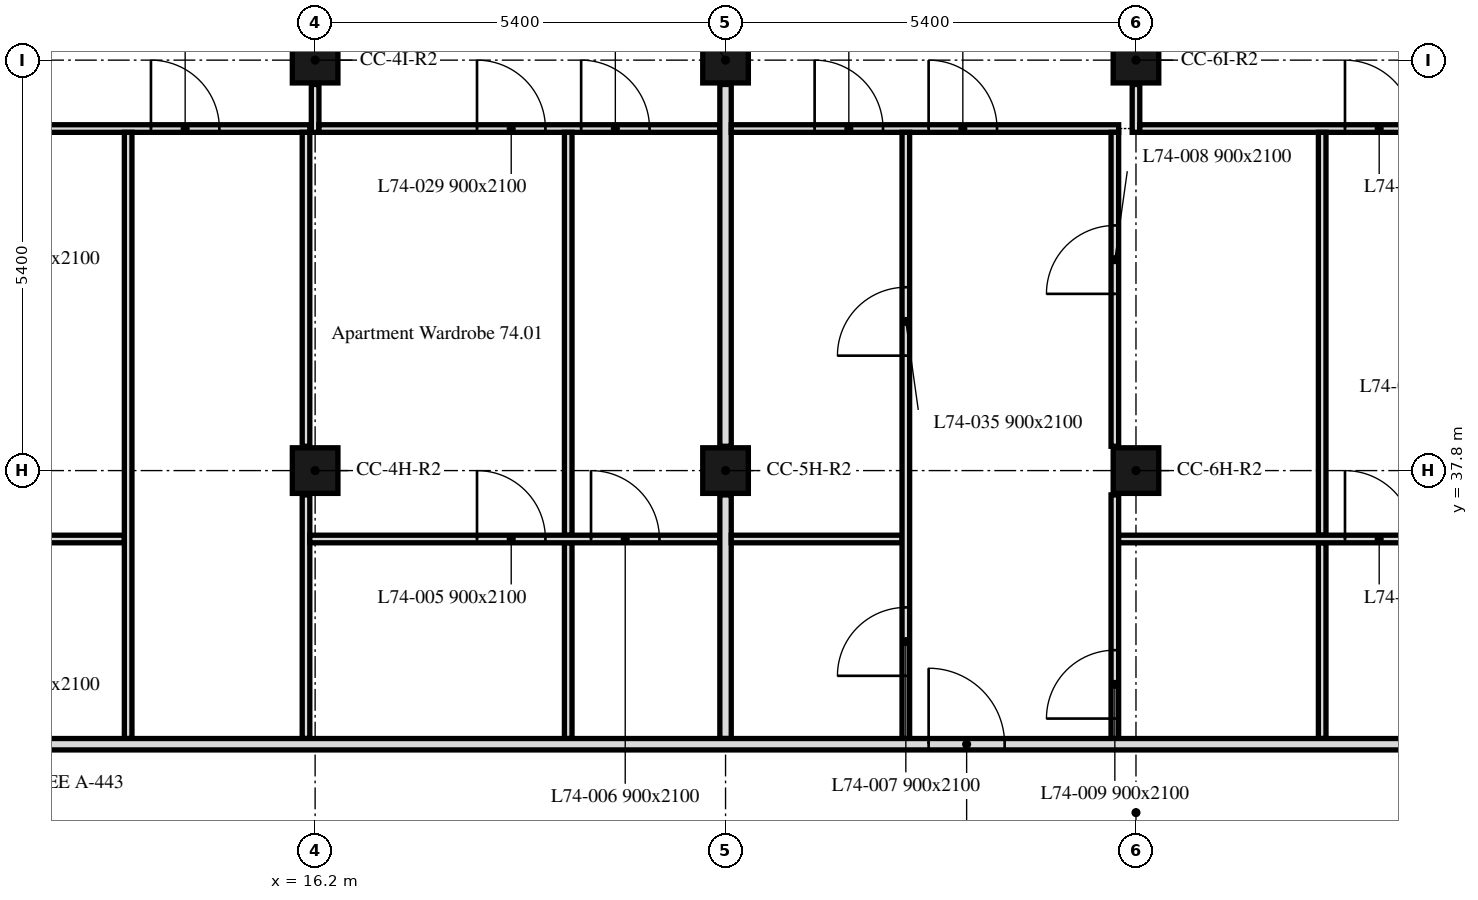
"""IFC4 building model, lengths in metres.
Left out: names, types, materials, properties, quantities, classifications, styles, units other than length and angle.
Written with IfcOpenShell. Run it as: python <this file> out.ifc"""

import sys

from ifc_helpers import new_model, si_unit, direction, frame, frame_2d, origin, origin_2d, place, context, subcontext, project, spatial, rectangle, extrude, element, fill, save


model = new_model("IFC4")
c1 = context("Model", 3, precision=1e-05, world=origin(), true_north=direction((0.0, 1.0)))
c2 = subcontext(c1, "Body", "Model", "MODEL_VIEW")
j1 = project(units=[si_unit("LENGTHUNIT", "METRE"), si_unit("PLANEANGLEUNIT", "RADIAN")], contexts=[c1])
p1 = place(None, origin())
s1 = spatial("IfcSite", under=j1, at=p1, CompositionType="ELEMENT")
p2 = place(p1, origin())
s2 = spatial("IfcBuilding", under=s1, at=p2, CompositionType="ELEMENT")
p3 = place(p2, frame((0.0, 0.0, 298.3)))
s3 = spatial("IfcBuildingStorey", under=s2, at=p3, CompositionType="ELEMENT", Elevation=298.3)
for number, where, z_axis, x_axis in (
    (1, (16.2, 37.8, 0.0), (0.0, 0.0, 1.0), (1.0, 0.0, 0.0)),
    (2, (21.6, 37.8, 0.0), (0.0, 0.0, 1.0), (1.0, 0.0, 0.0)),
    (3, (27.0, 37.8, 0.0), (0.0, 0.0, 1.0), (1.0, 0.0, 0.0)),
    (4, (16.2, 43.2, 0.0), (0.0, 0.0, 1.0), (1.0, 0.0, 0.0)),
    (5, (21.6, 43.2, 0.0), (0.0, 0.0, 1.0), (1.0, 0.0, 0.0)),
    (6, (27.0, 43.2, 0.0), (0.0, 0.0, 1.0), (1.0, 0.0, 0.0)),
):
    element("IfcColumn", number, at=place(p3, frame(where, z_axis=z_axis, x_axis=x_axis)), inside=s3, PredefinedType="COLUMN", context=c2, shape_type="SweptSolid", body=[
        extrude(rectangle(XDim=0.6, YDim=0.6, at=origin_2d()), origin(), (0.0, 0.0, 1.0), 3.0),
    ])
p4 = place(p3, frame((6.151, 42.3, 0.0), z_axis=(0.0, 0.0, 1.0), x_axis=(1.0, 0.0, 0.0)))
e7 = element("IfcWall", 7, at=p4, inside=s3, PredefinedType="PARTITIONING", context=c2, shape_type="SweptSolid", body=[
    extrude(rectangle(XDim=9.979, YDim=0.1, at=frame_2d((4.99, 0.0))), origin(), (0.0, 0.0, 1.0), 3.0),
])
p5 = place(p4, frame((7.889, 0.0, 0.0)))
e8 = element("IfcOpeningElement", 8, at=p5, cuts=e7, PredefinedType="OPENING", context=c2, shape_type="SweptSolid", body=[
    extrude(rectangle(XDim=0.9, YDim=2.1, at=frame_2d((0.45, 1.05))), frame((0.0, 0.05, 0.0), z_axis=(0.0, -1.0, 0.0), x_axis=(1.0, 0.0, 0.0)), (0.0, 0.0, 1.0), 0.1),
])
p6 = place(p4, frame((1.019, 0.0, 0.0)))
e9 = element("IfcOpeningElement", 9, at=p6, cuts=e7, PredefinedType="OPENING", context=c2, shape_type="SweptSolid", body=[
    extrude(rectangle(XDim=0.9, YDim=2.1, at=frame_2d((0.45, 1.05))), frame((0.0, 0.05, 0.0), z_axis=(0.0, -1.0, 0.0), x_axis=(1.0, 0.0, 0.0)), (0.0, 0.0, 1.0), 0.1),
])
p7 = place(p4, frame((2.389, 0.0, 0.0)))
e10 = element("IfcOpeningElement", 10, at=p7, cuts=e7, PredefinedType="OPENING", context=c2, shape_type="SweptSolid", body=[
    extrude(rectangle(XDim=0.9, YDim=2.1, at=frame_2d((0.45, 1.05))), frame((0.0, 0.05, 0.0), z_axis=(0.0, -1.0, 0.0), x_axis=(1.0, 0.0, 0.0)), (0.0, 0.0, 1.0), 0.1),
])
p8 = place(p3, frame((16.2, 42.25, 0.0), z_axis=(0.0, 0.0, 1.0), x_axis=(0.0, 1.0, 0.0)))
e11 = element("IfcWall", 11, at=p8, inside=s3, PredefinedType="PARTITIONING", context=c2, shape_type="SweptSolid", body=[
    extrude(rectangle(XDim=0.63, YDim=0.1, at=frame_2d((0.315, 0.0))), origin(), (0.0, 0.0, 1.0), 2.4),
])
p9 = place(p3, frame((16.25, 42.3, 0.0), z_axis=(0.0, 0.0, 1.0), x_axis=(1.0, 0.0, 0.0)))
e12 = element("IfcWall", 12, at=p9, inside=s3, PredefinedType="PARTITIONING", context=c2, shape_type="SweptSolid", body=[
    extrude(rectangle(XDim=5.275, YDim=0.1, at=frame_2d((2.637, 0.0))), origin(), (0.0, 0.0, 1.0), 3.0),
])
p10 = place(p9, frame((2.08, 0.0, 0.0)))
e13 = element("IfcOpeningElement", 13, at=p10, cuts=e12, PredefinedType="OPENING", context=c2, shape_type="SweptSolid", body=[
    extrude(rectangle(XDim=0.9, YDim=2.1, at=frame_2d((0.45, 1.05))), frame((0.0, 0.05, 0.0), z_axis=(0.0, -1.0, 0.0), x_axis=(1.0, 0.0, 0.0)), (0.0, 0.0, 1.0), 0.1),
])
p11 = place(p9, frame((3.45, 0.0, 0.0)))
e14 = element("IfcOpeningElement", 14, at=p11, cuts=e12, PredefinedType="OPENING", context=c2, shape_type="SweptSolid", body=[
    extrude(rectangle(XDim=0.9, YDim=2.1, at=frame_2d((0.45, 1.05))), frame((0.0, 0.05, 0.0), z_axis=(0.0, -1.0, 0.0), x_axis=(1.0, 0.0, 0.0)), (0.0, 0.0, 1.0), 0.1),
])
p12 = place(p3, frame((10.99, 36.9, 0.0), z_axis=(0.0, 0.0, 1.0), x_axis=(1.0, 0.0, 0.0)))
e15 = element("IfcWall", 15, at=p12, inside=s3, PredefinedType="PARTITIONING", context=c2, shape_type="SweptSolid", body=[
    extrude(rectangle(XDim=2.7, YDim=0.1, at=frame_2d((1.35, 0.0))), origin(), (0.0, 0.0, 1.0), 3.0),
])
p13 = place(p3, frame((13.74, 34.275, 0.0), z_axis=(0.0, 0.0, 1.0), x_axis=(0.0, 1.0, 0.0)))
e16 = element("IfcWall", 16, at=p13, inside=s3, PredefinedType="PARTITIONING", context=c2, shape_type="SweptSolid", body=[
    extrude(rectangle(XDim=7.975, YDim=0.1, at=frame_2d((3.988, 0.0))), origin(), (0.0, 0.0, 1.0), 3.0),
])
p14 = place(p3, frame((16.08, 34.275, 0.0), z_axis=(0.0, 0.0, 1.0), x_axis=(0.0, 1.0, 0.0)))
e17 = element("IfcWall", 17, at=p14, inside=s3, PredefinedType="PARTITIONING", context=c2, shape_type="SweptSolid", body=[
    extrude(rectangle(XDim=3.205, YDim=0.1, at=frame_2d((1.603, 0.0))), origin(), (0.0, 0.0, 1.0), 2.4),
])
p15 = place(p3, frame((16.08, 38.12, 0.0), z_axis=(0.0, 0.0, 1.0), x_axis=(0.0, 1.0, 0.0)))
e18 = element("IfcWall", 18, at=p15, inside=s3, PredefinedType="PARTITIONING", context=c2, shape_type="SweptSolid", body=[
    extrude(rectangle(XDim=4.13, YDim=0.1, at=frame_2d((2.065, 0.0))), origin(), (0.0, 0.0, 1.0), 2.4),
])
p16 = place(p3, frame((19.53, 36.95, 0.0), z_axis=(0.0, 0.0, 1.0), x_axis=(0.0, 1.0, 0.0)))
e19 = element("IfcWall", 19, at=p16, inside=s3, PredefinedType="PARTITIONING", context=c2, shape_type="SweptSolid", body=[
    extrude(rectangle(XDim=5.3, YDim=0.1, at=frame_2d((2.65, 0.0))), origin(), (0.0, 0.0, 1.0), 3.0),
])
p17 = place(p3, frame((19.53, 34.275, 0.0), z_axis=(0.0, 0.0, 1.0), x_axis=(0.0, 1.0, 0.0)))
e20 = element("IfcWall", 20, at=p17, inside=s3, PredefinedType="PARTITIONING", context=c2, shape_type="SweptSolid", body=[
    extrude(rectangle(XDim=2.575, YDim=0.1, at=frame_2d((1.288, 0.0))), origin(), (0.0, 0.0, 1.0), 3.0),
])
p18 = place(p3, frame((16.13, 36.9, 0.0), z_axis=(0.0, 0.0, 1.0), x_axis=(1.0, 0.0, 0.0)))
e21 = element("IfcWall", 21, at=p18, inside=s3, PredefinedType="PARTITIONING", context=c2, shape_type="SweptSolid", body=[
    extrude(rectangle(XDim=5.395, YDim=0.1, at=frame_2d((2.698, 0.0))), origin(), (0.0, 0.0, 1.0), 3.0),
])
p19 = place(p18, frame((2.2, 0.0, 0.0)))
e22 = element("IfcOpeningElement", 22, at=p19, cuts=e21, PredefinedType="OPENING", context=c2, shape_type="SweptSolid", body=[
    extrude(rectangle(XDim=0.9, YDim=2.1, at=frame_2d((0.45, 1.05))), frame((0.0, 0.05, 0.0), z_axis=(0.0, -1.0, 0.0), x_axis=(1.0, 0.0, 0.0)), (0.0, 0.0, 1.0), 0.1),
])
p20 = place(p18, frame((3.7, 0.0, 0.0)))
e23 = element("IfcOpeningElement", 23, at=p20, cuts=e21, PredefinedType="OPENING", context=c2, shape_type="SweptSolid", body=[
    extrude(rectangle(XDim=0.9, YDim=2.1, at=frame_2d((0.45, 1.05))), frame((0.0, 0.05, 0.0), z_axis=(0.0, -1.0, 0.0), x_axis=(1.0, 0.0, 0.0)), (0.0, 0.0, 1.0), 0.1),
])
p21 = place(p3, frame((21.6, 38.12, 0.0), z_axis=(0.0, 0.0, 1.0), x_axis=(0.0, 1.0, 0.0)))
e24 = element("IfcWall", 24, at=p21, inside=s3, PredefinedType="PARTITIONING", context=c2, shape_type="SweptSolid", body=[
    extrude(rectangle(XDim=4.76, YDim=0.15, at=frame_2d((2.38, 0.0))), origin(), (0.0, 0.0, 1.0), 2.4),
])
p22 = place(p3, frame((21.6, 34.275, 0.0), z_axis=(0.0, 0.0, 1.0), x_axis=(0.0, 1.0, 0.0)))
e25 = element("IfcWall", 25, at=p22, inside=s3, PredefinedType="PARTITIONING", context=c2, shape_type="SweptSolid", body=[
    extrude(rectangle(XDim=3.205, YDim=0.15, at=frame_2d((1.603, 0.0))), origin(), (0.0, 0.0, 1.0), 2.4),
])
p23 = place(p3, frame((21.675, 42.3, 0.0), z_axis=(0.0, 0.0, 1.0), x_axis=(1.0, 0.0, 0.0)))
e26 = element("IfcWall", 26, at=p23, inside=s3, PredefinedType="PARTITIONING", context=c2, shape_type="SweptSolid", body=[
    extrude(rectangle(XDim=5.097, YDim=0.1, at=frame_2d((2.548, 0.0))), origin(), (0.0, 0.0, 1.0), 3.0),
])
p24 = place(p23, frame((1.097, 0.0, 0.0)))
e27 = element("IfcOpeningElement", 27, at=p24, cuts=e26, PredefinedType="OPENING", context=c2, shape_type="SweptSolid", body=[
    extrude(rectangle(XDim=0.9, YDim=2.1, at=frame_2d((0.45, 1.05))), frame((0.0, 0.05, 0.0), z_axis=(0.0, -1.0, 0.0), x_axis=(1.0, 0.0, 0.0)), (0.0, 0.0, 1.0), 0.1),
])
p25 = place(p23, frame((2.597, 0.0, 0.0)))
e28 = element("IfcOpeningElement", 28, at=p25, cuts=e26, PredefinedType="OPENING", context=c2, shape_type="SweptSolid", body=[
    extrude(rectangle(XDim=0.9, YDim=2.1, at=frame_2d((0.45, 1.05))), frame((0.0, 0.05, 0.0), z_axis=(0.0, -1.0, 0.0), x_axis=(1.0, 0.0, 0.0)), (0.0, 0.0, 1.0), 0.1),
])
p26 = place(p3, frame((27.0, 42.25, 0.0), z_axis=(0.0, 0.0, 1.0), x_axis=(0.0, 1.0, 0.0)))
e29 = element("IfcWall", 29, at=p26, inside=s3, PredefinedType="PARTITIONING", context=c2, shape_type="SweptSolid", body=[
    extrude(rectangle(XDim=0.63, YDim=0.1, at=frame_2d((0.315, 0.0))), origin(), (0.0, 0.0, 1.0), 2.4),
])
p27 = place(p3, frame((27.05, 42.3, 0.0), z_axis=(0.0, 0.0, 1.0), x_axis=(1.0, 0.0, 0.0)))
e30 = element("IfcWall", 30, at=p27, inside=s3, PredefinedType="PARTITIONING", context=c2, shape_type="SweptSolid", body=[
    extrude(rectangle(XDim=5.275, YDim=0.1, at=frame_2d((2.637, 0.0))), origin(), (0.0, 0.0, 1.0), 3.0),
])
p28 = place(p27, frame((2.7, 0.0, 0.0)))
e31 = element("IfcOpeningElement", 31, at=p28, cuts=e30, PredefinedType="OPENING", context=c2, shape_type="SweptSolid", body=[
    extrude(rectangle(XDim=0.9, YDim=2.1, at=frame_2d((0.45, 1.05))), frame((0.0, 0.05, 0.0), z_axis=(0.0, -1.0, 0.0), x_axis=(1.0, 0.0, 0.0)), (0.0, 0.0, 1.0), 0.1),
])
p29 = place(p3, frame((21.675, 36.9, 0.0), z_axis=(0.0, 0.0, 1.0), x_axis=(1.0, 0.0, 0.0)))
e32 = element("IfcWall", 32, at=p29, inside=s3, PredefinedType="PARTITIONING", context=c2, shape_type="SweptSolid", body=[
    extrude(rectangle(XDim=2.247, YDim=0.1, at=frame_2d((1.124, 0.0))), origin(), (0.0, 0.0, 1.0), 3.0),
])
p30 = place(p3, frame((23.972, 34.275, 0.0), z_axis=(0.0, 0.0, 1.0), x_axis=(0.0, 1.0, 0.0)))
e33 = element("IfcWall", 33, at=p30, inside=s3, PredefinedType="PARTITIONING", context=c2, shape_type="SweptSolid", body=[
    extrude(rectangle(XDim=7.975, YDim=0.1, at=frame_2d((3.988, 0.0))), origin(), (0.0, 0.0, 1.0), 3.0),
])
p31 = place(p30, frame((0.825, 0.0, 0.0)))
e34 = element("IfcOpeningElement", 34, at=p31, cuts=e33, PredefinedType="OPENING", context=c2, shape_type="SweptSolid", body=[
    extrude(rectangle(XDim=0.9, YDim=2.1, at=frame_2d((0.45, 1.05))), frame((0.0, 0.05, 0.0), z_axis=(0.0, -1.0, 0.0), x_axis=(1.0, 0.0, 0.0)), (0.0, 0.0, 1.0), 0.1),
])
p32 = place(p30, frame((5.037, 0.0, 0.0)))
e35 = element("IfcOpeningElement", 35, at=p32, cuts=e33, PredefinedType="OPENING", context=c2, shape_type="SweptSolid", body=[
    extrude(rectangle(XDim=0.9, YDim=2.1, at=frame_2d((0.45, 1.05))), frame((0.0, 0.05, 0.0), z_axis=(0.0, -1.0, 0.0), x_axis=(1.0, 0.0, 0.0)), (0.0, 0.0, 1.0), 0.1),
])
p33 = place(p3, frame((26.722, 34.275, 0.0), z_axis=(0.0, 0.0, 1.0), x_axis=(0.0, 1.0, 0.0)))
e36 = element("IfcWall", 36, at=p33, inside=s3, PredefinedType="PARTITIONING", context=c2, shape_type="SweptSolid", body=[
    extrude(rectangle(XDim=3.205, YDim=0.1, at=frame_2d((1.603, 0.0))), origin(), (0.0, 0.0, 1.0), 3.0),
])
p34 = place(p33, frame((0.262, 0.0, 0.0)))
e37 = element("IfcOpeningElement", 37, at=p34, cuts=e36, PredefinedType="OPENING", context=c2, shape_type="SweptSolid", body=[
    extrude(rectangle(XDim=0.9, YDim=2.1, at=frame_2d((0.45, 1.05))), frame((0.0, 0.05, 0.0), z_axis=(0.0, -1.0, 0.0), x_axis=(1.0, 0.0, 0.0)), (0.0, 0.0, 1.0), 0.1),
])
p35 = place(p3, frame((26.722, 38.12, 0.0), z_axis=(0.0, 0.0, 1.0), x_axis=(0.0, 1.0, 0.0)))
e38 = element("IfcWall", 38, at=p35, inside=s3, PredefinedType="PARTITIONING", context=c2, shape_type="SweptSolid", body=[
    extrude(rectangle(XDim=4.13, YDim=0.1, at=frame_2d((2.065, 0.0))), origin(), (0.0, 0.0, 1.0), 3.0),
])
p36 = place(p35, frame((2.005, 0.0, 0.0)))
e39 = element("IfcOpeningElement", 39, at=p36, cuts=e38, PredefinedType="OPENING", context=c2, shape_type="SweptSolid", body=[
    extrude(rectangle(XDim=0.9, YDim=2.1, at=frame_2d((0.45, 1.05))), frame((0.0, 0.05, 0.0), z_axis=(0.0, -1.0, 0.0), x_axis=(1.0, 0.0, 0.0)), (0.0, 0.0, 1.0), 0.1),
])
p37 = place(p3, frame((29.45, 36.95, 0.0), z_axis=(0.0, 0.0, 1.0), x_axis=(0.0, 1.0, 0.0)))
e40 = element("IfcWall", 40, at=p37, inside=s3, PredefinedType="PARTITIONING", context=c2, shape_type="SweptSolid", body=[
    extrude(rectangle(XDim=5.3, YDim=0.1, at=frame_2d((2.65, 0.0))), origin(), (0.0, 0.0, 1.0), 3.0),
])
p38 = place(p3, frame((29.45, 34.275, 0.0), z_axis=(0.0, 0.0, 1.0), x_axis=(0.0, 1.0, 0.0)))
e41 = element("IfcWall", 41, at=p38, inside=s3, PredefinedType="PARTITIONING", context=c2, shape_type="SweptSolid", body=[
    extrude(rectangle(XDim=2.575, YDim=0.1, at=frame_2d((1.288, 0.0))), origin(), (0.0, 0.0, 1.0), 3.0),
])
p39 = place(p3, frame((26.772, 36.9, 0.0), z_axis=(0.0, 0.0, 1.0), x_axis=(1.0, 0.0, 0.0)))
e42 = element("IfcWall", 42, at=p39, inside=s3, PredefinedType="PARTITIONING", context=c2, shape_type="SweptSolid", body=[
    extrude(rectangle(XDim=5.553, YDim=0.1, at=frame_2d((2.776, 0.0))), origin(), (0.0, 0.0, 1.0), 2.4),
])
p40 = place(p39, frame((2.978, 0.0, 0.0)))
e43 = element("IfcOpeningElement", 43, at=p40, cuts=e42, PredefinedType="OPENING", context=c2, shape_type="SweptSolid", body=[
    extrude(rectangle(XDim=0.9, YDim=2.1, at=frame_2d((0.45, 1.05))), frame((0.0, 0.05, 0.0), z_axis=(0.0, -1.0, 0.0), x_axis=(1.0, 0.0, 0.0)), (0.0, 0.0, 1.0), 0.1),
])
p41 = place(p3, frame((6.151, 34.2, 0.0), z_axis=(0.0, 0.0, 1.0), x_axis=(1.0, 0.0, 0.0)))
e44 = element("IfcWall", 44, at=p41, inside=s3, PredefinedType="PARTITIONING", context=c2, shape_type="SweptSolid", body=[
    extrude(rectangle(XDim=41.698, YDim=0.15, at=frame_2d((20.849, 0.0))), origin(), (0.0, 0.0, 1.0), 2.4),
])
p42 = place(p41, frame((2.939, 0.0, 0.0)))
e45 = element("IfcOpeningElement", 45, at=p42, cuts=e44, PredefinedType="OPENING", context=c2, shape_type="SweptSolid", body=[
    extrude(rectangle(XDim=1.0, YDim=2.1, at=frame_2d((0.5, 1.05))), frame((0.0, 0.075, 0.0), z_axis=(0.0, -1.0, 0.0), x_axis=(1.0, 0.0, 0.0)), (0.0, 0.0, 1.0), 0.15),
])
p43 = place(p41, frame((18.121, 0.0, 0.0)))
e46 = element("IfcOpeningElement", 46, at=p43, cuts=e44, PredefinedType="OPENING", context=c2, shape_type="SweptSolid", body=[
    extrude(rectangle(XDim=1.0, YDim=2.1, at=frame_2d((0.5, 1.05))), frame((0.0, 0.075, 0.0), z_axis=(0.0, -1.0, 0.0), x_axis=(1.0, 0.0, 0.0)), (0.0, 0.0, 1.0), 0.15),
])
p44 = place(p41, frame((32.359, 0.0, 0.0)))
e47 = element("IfcOpeningElement", 47, at=p44, cuts=e44, PredefinedType="OPENING", context=c2, shape_type="SweptSolid", body=[
    extrude(rectangle(XDim=1.0, YDim=2.1, at=frame_2d((0.5, 1.05))), frame((0.0, 0.075, 0.0), z_axis=(0.0, -1.0, 0.0), x_axis=(1.0, 0.0, 0.0)), (0.0, 0.0, 1.0), 0.15),
])
p45 = place(p5, origin())
e48 = element("IfcDoor", 48, at=p45, inside=s3, OperationType="SINGLE_SWING_LEFT", PredefinedType="DOOR", context=c2, shape_type="SweptSolid", body=[
    extrude(rectangle(XDim=0.9, YDim=2.1, at=frame_2d((0.45, 1.05))), frame((0.0, 0.025, 0.0), z_axis=(0.0, -1.0, 0.0), x_axis=(1.0, 0.0, 0.0)), (0.0, 0.0, 1.0), 0.05),
])
fill(e8, e48)
p46 = place(p19, origin())
e49 = element("IfcDoor", 49, at=p46, inside=s3, OperationType="SINGLE_SWING_LEFT", PredefinedType="DOOR", context=c2, shape_type="SweptSolid", body=[
    extrude(rectangle(XDim=0.9, YDim=2.1, at=frame_2d((0.45, 1.05))), frame((0.0, 0.025, 0.0), z_axis=(0.0, -1.0, 0.0), x_axis=(1.0, 0.0, 0.0)), (0.0, 0.0, 1.0), 0.05),
])
fill(e22, e49)
p47 = place(p20, origin())
e50 = element("IfcDoor", 50, at=p47, inside=s3, OperationType="SINGLE_SWING_LEFT", PredefinedType="DOOR", context=c2, shape_type="SweptSolid", body=[
    extrude(rectangle(XDim=0.9, YDim=2.1, at=frame_2d((0.45, 1.05))), frame((0.0, 0.025, 0.0), z_axis=(0.0, -1.0, 0.0), x_axis=(1.0, 0.0, 0.0)), (0.0, 0.0, 1.0), 0.05),
])
fill(e23, e50)
p48 = place(p31, origin())
e51 = element("IfcDoor", 51, at=p48, inside=s3, OperationType="SINGLE_SWING_RIGHT", PredefinedType="DOOR", context=c2, shape_type="SweptSolid", body=[
    extrude(rectangle(XDim=0.9, YDim=2.1, at=frame_2d((0.45, 1.05))), frame((0.0, 0.025, 0.0), z_axis=(0.0, -1.0, 0.0), x_axis=(1.0, 0.0, 0.0)), (0.0, 0.0, 1.0), 0.05),
])
fill(e34, e51)
p49 = place(p36, origin())
e52 = element("IfcDoor", 52, at=p49, inside=s3, OperationType="SINGLE_SWING_LEFT", PredefinedType="DOOR", context=c2, shape_type="SweptSolid", body=[
    extrude(rectangle(XDim=0.9, YDim=2.1, at=frame_2d((0.45, 1.05))), frame((0.0, 0.025, 0.0), z_axis=(0.0, -1.0, 0.0), x_axis=(1.0, 0.0, 0.0)), (0.0, 0.0, 1.0), 0.05),
])
fill(e39, e52)
p50 = place(p34, origin())
e53 = element("IfcDoor", 53, at=p50, inside=s3, OperationType="SINGLE_SWING_LEFT", PredefinedType="DOOR", context=c2, shape_type="SweptSolid", body=[
    extrude(rectangle(XDim=0.9, YDim=2.1, at=frame_2d((0.45, 1.05))), frame((0.0, 0.025, 0.0), z_axis=(0.0, -1.0, 0.0), x_axis=(1.0, 0.0, 0.0)), (0.0, 0.0, 1.0), 0.05),
])
fill(e37, e53)
p51 = place(p40, origin())
e54 = element("IfcDoor", 54, at=p51, inside=s3, OperationType="SINGLE_SWING_LEFT", PredefinedType="DOOR", context=c2, shape_type="SweptSolid", body=[
    extrude(rectangle(XDim=0.9, YDim=2.1, at=frame_2d((0.45, 1.05))), frame((0.0, 0.025, 0.0), z_axis=(0.0, -1.0, 0.0), x_axis=(1.0, 0.0, 0.0)), (0.0, 0.0, 1.0), 0.05),
])
fill(e43, e54)
p52 = place(p10, origin())
e55 = element("IfcDoor", 55, at=p52, inside=s3, OperationType="SINGLE_SWING_RIGHT", PredefinedType="DOOR", context=c2, shape_type="SweptSolid", body=[
    extrude(rectangle(XDim=0.9, YDim=2.1, at=frame_2d((0.45, 1.05))), frame((0.0, 0.025, 0.0), z_axis=(0.0, -1.0, 0.0), x_axis=(1.0, 0.0, 0.0)), (0.0, 0.0, 1.0), 0.05),
])
fill(e13, e55)
p53 = place(p11, origin())
e56 = element("IfcDoor", 56, at=p53, inside=s3, OperationType="SINGLE_SWING_LEFT", PredefinedType="DOOR", context=c2, shape_type="SweptSolid", body=[
    extrude(rectangle(XDim=0.9, YDim=2.1, at=frame_2d((0.45, 1.05))), frame((0.0, 0.025, 0.0), z_axis=(0.0, -1.0, 0.0), x_axis=(1.0, 0.0, 0.0)), (0.0, 0.0, 1.0), 0.05),
])
fill(e14, e56)
p54 = place(p24, origin())
e57 = element("IfcDoor", 57, at=p54, inside=s3, OperationType="SINGLE_SWING_RIGHT", PredefinedType="DOOR", context=c2, shape_type="SweptSolid", body=[
    extrude(rectangle(XDim=0.9, YDim=2.1, at=frame_2d((0.45, 1.05))), frame((0.0, 0.025, 0.0), z_axis=(0.0, -1.0, 0.0), x_axis=(1.0, 0.0, 0.0)), (0.0, 0.0, 1.0), 0.05),
])
fill(e27, e57)
p55 = place(p28, origin())
e58 = element("IfcDoor", 58, at=p55, inside=s3, OperationType="SINGLE_SWING_LEFT", PredefinedType="DOOR", context=c2, shape_type="SweptSolid", body=[
    extrude(rectangle(XDim=0.9, YDim=2.1, at=frame_2d((0.45, 1.05))), frame((0.0, 0.025, 0.0), z_axis=(0.0, -1.0, 0.0), x_axis=(1.0, 0.0, 0.0)), (0.0, 0.0, 1.0), 0.05),
])
fill(e31, e58)
p56 = place(p32, origin())
e59 = element("IfcDoor", 59, at=p56, inside=s3, OperationType="SINGLE_SWING_LEFT", PredefinedType="DOOR", context=c2, shape_type="SweptSolid", body=[
    extrude(rectangle(XDim=0.9, YDim=2.1, at=frame_2d((0.45, 1.05))), frame((0.0, 0.025, 0.0), z_axis=(0.0, -1.0, 0.0), x_axis=(1.0, 0.0, 0.0)), (0.0, 0.0, 1.0), 0.05),
])
fill(e35, e59)
p57 = place(p25, origin())
e60 = element("IfcDoor", 60, at=p57, inside=s3, OperationType="SINGLE_SWING_LEFT", PredefinedType="DOOR", context=c2, shape_type="SweptSolid", body=[
    extrude(rectangle(XDim=0.9, YDim=2.1, at=frame_2d((0.45, 1.05))), frame((0.0, 0.025, 0.0), z_axis=(0.0, -1.0, 0.0), x_axis=(1.0, 0.0, 0.0)), (0.0, 0.0, 1.0), 0.05),
])
fill(e28, e60)
p58 = place(p43, origin())
e61 = element("IfcDoor", 61, at=p58, inside=s3, OperationType="SINGLE_SWING_LEFT", PredefinedType="DOOR", context=c2, shape_type="SweptSolid", body=[
    extrude(rectangle(XDim=1.0, YDim=2.1, at=frame_2d((0.5, 1.05))), frame((0.0, 0.025, 0.0), z_axis=(0.0, -1.0, 0.0), x_axis=(1.0, 0.0, 0.0)), (0.0, 0.0, 1.0), 0.05),
])
fill(e46, e61)
save(model, sys.argv[1])
